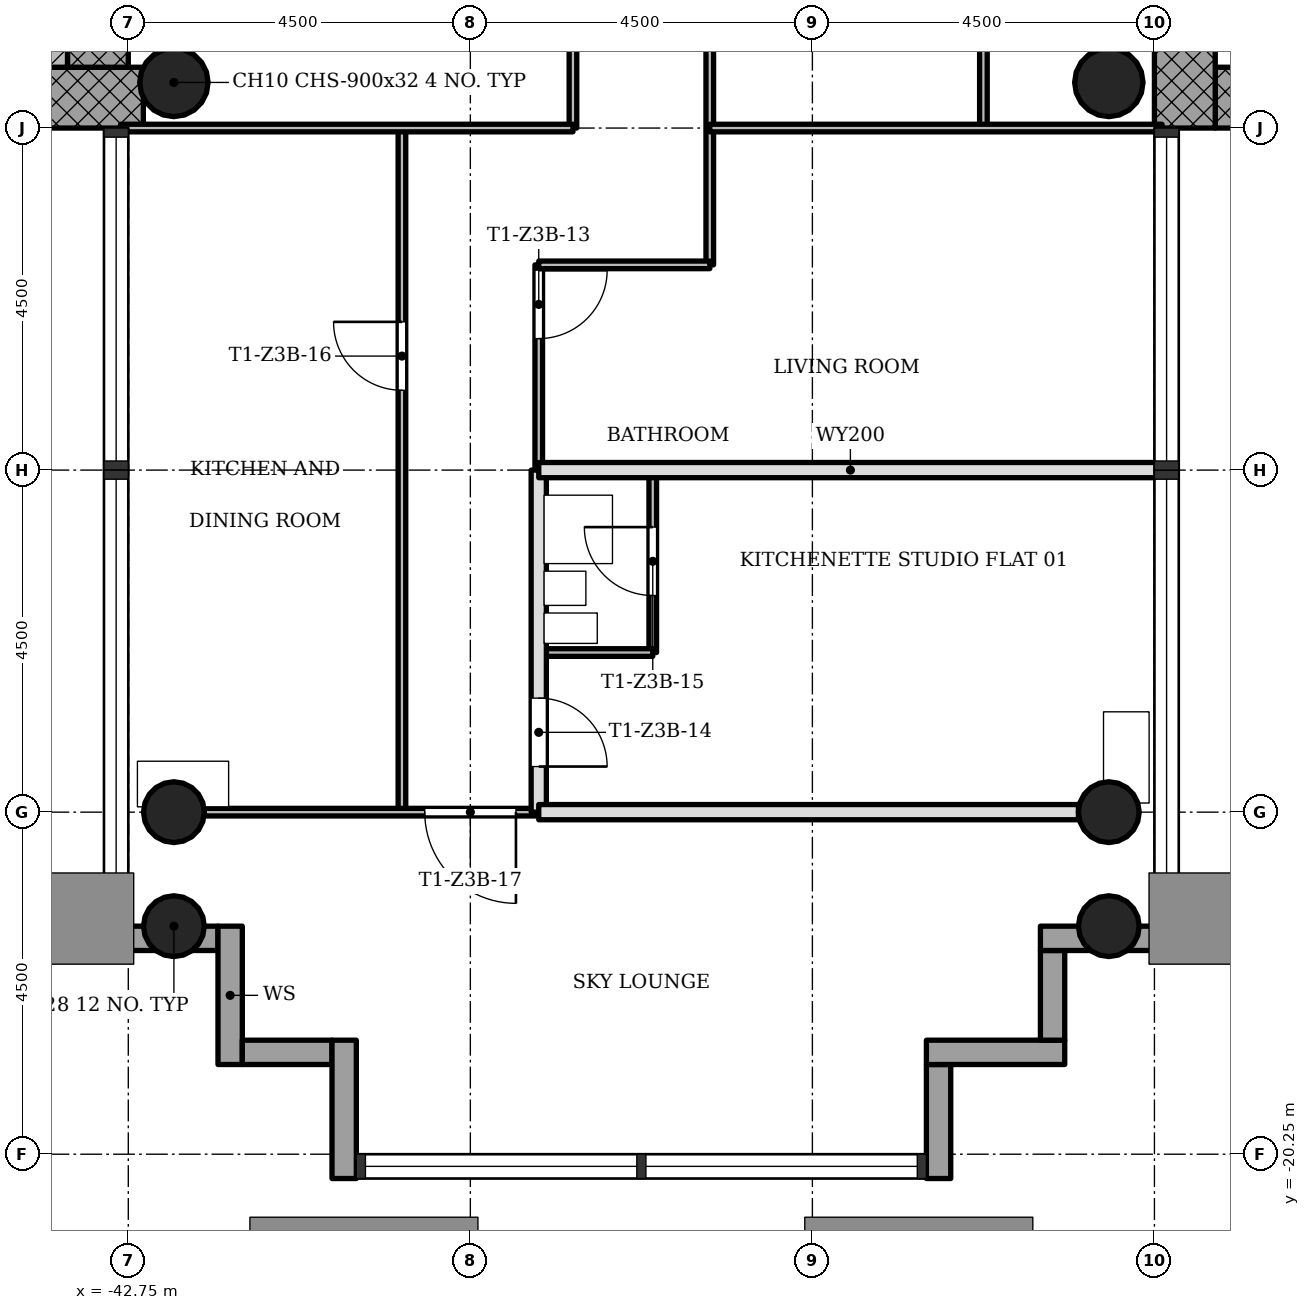
"""IFC4 building model, lengths in metres.
Left out: names, types, materials, properties, quantities, classifications, styles, units other than length and angle.
Written with IfcOpenShell. Run it as: python <this file> out.ifc"""

import sys

from ifc_helpers import new_model, si_unit, direction, frame, frame_2d, origin, origin_2d, place, context, subcontext, project, spatial, rectangle, hollow_circle, extrude, element, fill, save


model = new_model("IFC4")
c1 = context("Model", 3, precision=1e-05, world=origin(), true_north=direction((0.0, 1.0)))
c2 = subcontext(c1, "Body", "Model", "MODEL_VIEW")
j1 = project(units=[si_unit("LENGTHUNIT", "METRE"), si_unit("PLANEANGLEUNIT", "RADIAN")], contexts=[c1])
p1 = place(None, origin())
s1 = spatial("IfcSite", under=j1, at=p1, CompositionType="ELEMENT")
p2 = place(p1, origin())
s2 = spatial("IfcBuilding", under=s1, at=p2, CompositionType="ELEMENT")
p3 = place(p2, frame((0.0, 0.0, 143.9)))
s3 = spatial("IfcBuildingStorey", under=s2, at=p3, CompositionType="ELEMENT", Elevation=143.9)
p4 = place(p3, frame((-28.45, -6.35, 0.0), z_axis=(0.0, 0.0, 1.0), x_axis=(1.0, 0.0, 0.0)))
e1 = element("IfcWall", 1, at=p4, inside=s3, PredefinedType="SHEAR", context=c2, shape_type="SweptSolid", body=[
    extrude(rectangle(XDim=8.2, YDim=0.8, at=frame_2d((4.1, 0.0))), origin(), (0.0, 0.0, 1.0), 3.4),
])
p5 = place(p3, frame((-28.85, 5.95, 0.0), z_axis=(0.0, 0.0, 1.0), x_axis=(0.0, -1.0, 0.0)))
e2 = element("IfcWall", 2, at=p5, inside=s3, PredefinedType="SHEAR", context=c2, shape_type="SweptSolid", body=[
    extrude(rectangle(XDim=12.7, YDim=0.8, at=frame_2d((6.35, 0.0))), origin(), (0.0, 0.0, 1.0), 3.4),
])
p6 = place(p5, frame((5.05, 0.0, 0.0)))
e3 = element("IfcOpeningElement", 3, at=p6, cuts=e2, PredefinedType="OPENING", context=c2, shape_type="SweptSolid", body=[
    extrude(rectangle(XDim=1.8, YDim=2.1, at=frame_2d((0.9, 1.05))), frame((0.0, 0.41, 0.0), z_axis=(0.0, -1.0, 0.0), x_axis=(1.0, 0.0, 0.0)), (0.0, 0.0, 1.0), 0.82),
])
p7 = place(p3, frame((-50.95, -6.35, 0.0), z_axis=(0.0, 0.0, 1.0), x_axis=(1.0, 0.0, 0.0)))
e4 = element("IfcWall", 4, at=p7, inside=s3, PredefinedType="SHEAR", context=c2, shape_type="SweptSolid", body=[
    extrude(rectangle(XDim=8.398, YDim=0.8, at=frame_2d((4.199, 0.0))), origin(), (0.0, 0.0, 1.0), 3.4),
])
p8 = place(p3, frame((-43.15, -5.95, 0.0), z_axis=(0.0, 0.0, 1.0), x_axis=(0.0, 1.0, 0.0)))
e5 = element("IfcWall", 5, at=p8, inside=s3, PredefinedType="SHEAR", context=c2, shape_type="SweptSolid", body=[
    extrude(rectangle(XDim=12.7, YDim=0.8, at=frame_2d((6.35, 0.0))), origin(), (0.0, 0.0, 1.0), 3.4),
])
p9 = place(p8, frame((5.05, 0.0, 0.0)))
e6 = element("IfcOpeningElement", 6, at=p9, cuts=e5, PredefinedType="OPENING", context=c2, shape_type="SweptSolid", body=[
    extrude(rectangle(XDim=1.8, YDim=2.1, at=frame_2d((0.9, 1.05))), frame((0.0, 0.41, 0.0), z_axis=(0.0, -1.0, 0.0), x_axis=(1.0, 0.0, 0.0)), (0.0, 0.0, 1.0), 0.82),
])
for number, where, z_axis, x_axis in (
    (7, (-42.15, -15.75, 0.0), (0.0, 0.0, 1.0), (1.0, 0.0, 0.0)),
    (8, (-29.85, -15.75, 0.0), (0.0, 0.0, 1.0), (1.0, 0.0, 0.0)),
    (9, (-42.15, -17.25, 0.0), (0.0, 0.0, 1.0), (1.0, 0.0, 0.0)),
    (10, (-29.85, -17.25, 0.0), (0.0, 0.0, 1.0), (1.0, 0.0, 0.0)),
):
    element("IfcColumn", number, at=place(p3, frame(where, z_axis=z_axis, x_axis=x_axis)), inside=s3, PredefinedType="COLUMN", context=c2, shape_type="SweptSolid", body=[
        extrude(hollow_circle(Radius=0.4, WallThickness=0.028, at=origin_2d()), origin(), (0.0, 0.0, 1.0), 3.4),
    ])
for number, where, z_axis, x_axis in (
    (11, (-42.15, -6.15, 0.0), (0.0, 0.0, 1.0), (1.0, 0.0, 0.0)),
    (12, (-29.85, -6.15, 0.0), (0.0, 0.0, 1.0), (1.0, 0.0, 0.0)),
):
    element("IfcColumn", number, at=place(p3, frame(where, z_axis=z_axis, x_axis=x_axis)), inside=s3, PredefinedType="COLUMN", context=c2, shape_type="SweptSolid", body=[
        extrude(hollow_circle(Radius=0.45, WallThickness=0.032, at=origin_2d()), origin(), (0.0, 0.0, 1.0), 3.4),
    ])
p10 = place(p3, frame((-43.07, -17.41, -0.3), z_axis=(0.0, 0.0, 1.0), x_axis=(1.0, 0.0, 0.0)))
e13 = element("IfcWall", 13, at=p10, inside=s3, PredefinedType="STANDARD", context=c2, shape_type="SweptSolid", body=[
    extrude(rectangle(XDim=1.5, YDim=0.32, at=frame_2d((0.75, 0.0))), origin(), (0.0, 0.0, 1.0), 3.4),
])
p11 = place(p3, frame((-41.41, -17.25, -0.3), z_axis=(0.0, 0.0, 1.0), x_axis=(0.0, -1.0, 0.0)))
e14 = element("IfcWall", 14, at=p11, inside=s3, PredefinedType="STANDARD", context=c2, shape_type="SweptSolid", body=[
    extrude(rectangle(XDim=1.82, YDim=0.32, at=frame_2d((0.91, 0.0))), origin(), (0.0, 0.0, 1.0), 3.4),
])
p12 = place(p3, frame((-41.25, -18.91, -0.3), z_axis=(0.0, 0.0, 1.0), x_axis=(1.0, 0.0, 0.0)))
e15 = element("IfcWall", 15, at=p12, inside=s3, PredefinedType="STANDARD", context=c2, shape_type="SweptSolid", body=[
    extrude(rectangle(XDim=1.18, YDim=0.32, at=frame_2d((0.59, 0.0))), origin(), (0.0, 0.0, 1.0), 3.4),
])
p13 = place(p3, frame((-39.91, -18.75, -0.3), z_axis=(0.0, 0.0, 1.0), x_axis=(0.0, -1.0, 0.0)))
e16 = element("IfcWall", 16, at=p13, inside=s3, PredefinedType="STANDARD", context=c2, shape_type="SweptSolid", body=[
    extrude(rectangle(XDim=1.82, YDim=0.32, at=frame_2d((0.91, 0.0))), origin(), (0.0, 0.0, 1.0), 3.4),
])
p14 = place(p3, frame((-32.09, -20.57, -0.3), z_axis=(0.0, 0.0, 1.0), x_axis=(0.0, 1.0, 0.0)))
e17 = element("IfcWall", 17, at=p14, inside=s3, PredefinedType="STANDARD", context=c2, shape_type="SweptSolid", body=[
    extrude(rectangle(XDim=1.5, YDim=0.32, at=frame_2d((0.75, 0.0))), origin(), (0.0, 0.0, 1.0), 3.4),
])
p15 = place(p3, frame((-32.25, -18.91, -0.3), z_axis=(0.0, 0.0, 1.0), x_axis=(1.0, 0.0, 0.0)))
e18 = element("IfcWall", 18, at=p15, inside=s3, PredefinedType="STANDARD", context=c2, shape_type="SweptSolid", body=[
    extrude(rectangle(XDim=1.82, YDim=0.32, at=frame_2d((0.91, 0.0))), origin(), (0.0, 0.0, 1.0), 3.4),
])
p16 = place(p3, frame((-30.59, -18.75, -0.3), z_axis=(0.0, 0.0, 1.0), x_axis=(0.0, 1.0, 0.0)))
e19 = element("IfcWall", 19, at=p16, inside=s3, PredefinedType="STANDARD", context=c2, shape_type="SweptSolid", body=[
    extrude(rectangle(XDim=1.18, YDim=0.32, at=frame_2d((0.59, 0.0))), origin(), (0.0, 0.0, 1.0), 3.4),
])
p17 = place(p3, frame((-30.75, -17.41, -0.3), z_axis=(0.0, 0.0, 1.0), x_axis=(1.0, 0.0, 0.0)))
e20 = element("IfcWall", 20, at=p17, inside=s3, PredefinedType="STANDARD", context=c2, shape_type="SweptSolid", body=[
    extrude(rectangle(XDim=1.82, YDim=0.32, at=frame_2d((0.91, 0.0))), origin(), (0.0, 0.0, 1.0), 3.4),
])
p18 = place(p3, frame((-39.15, -15.75, 0.0), z_axis=(0.0, 0.0, 1.0), x_axis=(0.0, 1.0, 0.0)))
e21 = element("IfcWall", 21, at=p18, inside=s3, PredefinedType="PARTITIONING", context=c2, shape_type="SweptSolid", body=[
    extrude(rectangle(XDim=9.0, YDim=0.1, at=frame_2d((4.5, 0.0))), origin(), (0.0, 0.0, 1.0), 3.0),
])
p19 = place(p18, frame((5.55, 0.0, 0.0)))
e22 = element("IfcOpeningElement", 22, at=p19, cuts=e21, PredefinedType="OPENING", context=c2, shape_type="SweptSolid", body=[
    extrude(rectangle(XDim=0.9, YDim=2.1, at=frame_2d((0.45, 1.05))), frame((0.0, 0.06, 0.0), z_axis=(0.0, -1.0, 0.0), x_axis=(1.0, 0.0, 0.0)), (0.0, 0.0, 1.0), 0.12),
])
p20 = place(p3, frame((-37.35, -11.25, 0.0), z_axis=(0.0, 0.0, 1.0), x_axis=(0.0, 1.0, 0.0)))
e23 = element("IfcWall", 23, at=p20, inside=s3, PredefinedType="PARTITIONING", context=c2, shape_type="SweptSolid", body=[
    extrude(rectangle(XDim=2.7, YDim=0.1, at=frame_2d((1.35, 0.0))), origin(), (0.0, 0.0, 1.0), 3.0),
])
p21 = place(p20, frame((1.73, 0.0, 0.0)))
e24 = element("IfcOpeningElement", 24, at=p21, cuts=e23, PredefinedType="OPENING", context=c2, shape_type="SweptSolid", body=[
    extrude(rectangle(XDim=0.9, YDim=2.1, at=frame_2d((0.45, 1.05))), frame((0.0, 0.06, 0.0), z_axis=(0.0, -1.0, 0.0), x_axis=(1.0, 0.0, 0.0)), (0.0, 0.0, 1.0), 0.12),
])
p22 = place(p3, frame((-37.35, -15.75, 0.0), z_axis=(0.0, 0.0, 1.0), x_axis=(0.0, 1.0, 0.0)))
e25 = element("IfcWall", 25, at=p22, inside=s3, PredefinedType="SOLIDWALL", context=c2, shape_type="SweptSolid", body=[
    extrude(rectangle(XDim=4.5, YDim=0.2, at=frame_2d((2.25, 0.0))), origin(), (0.0, 0.0, 1.0), 3.0),
])
p23 = place(p22, frame((0.6, 0.0, 0.0)))
e26 = element("IfcOpeningElement", 26, at=p23, cuts=e25, PredefinedType="OPENING", context=c2, shape_type="SweptSolid", body=[
    extrude(rectangle(XDim=0.9, YDim=2.1, at=frame_2d((0.45, 1.05))), frame((0.0, 0.11, 0.0), z_axis=(0.0, -1.0, 0.0), x_axis=(1.0, 0.0, 0.0)), (0.0, 0.0, 1.0), 0.22),
])
p24 = place(p3, frame((-36.9, -6.75, 0.0), z_axis=(0.0, 0.0, 1.0), x_axis=(0.0, 1.0, 0.0)))
e27 = element("IfcWall", 27, at=p24, inside=s3, PredefinedType="PARTITIONING", context=c2, shape_type="SweptSolid", body=[
    extrude(rectangle(XDim=2.25, YDim=0.1, at=frame_2d((1.125, 0.0))), origin(), (0.0, 0.0, 1.0), 3.0),
])
p25 = place(p3, frame((-35.85, -13.65, 0.0), z_axis=(0.0, 0.0, 1.0), x_axis=(0.0, 1.0, 0.0)))
e28 = element("IfcWall", 28, at=p25, inside=s3, PredefinedType="PARTITIONING", context=c2, shape_type="SweptSolid", body=[
    extrude(rectangle(XDim=2.4, YDim=0.1, at=frame_2d((1.2, 0.0))), origin(), (0.0, 0.0, 1.0), 3.0),
])
p26 = place(p25, frame((0.75, 0.0, 0.0)))
e29 = element("IfcOpeningElement", 29, at=p26, cuts=e28, PredefinedType="OPENING", context=c2, shape_type="SweptSolid", body=[
    extrude(rectangle(XDim=0.9, YDim=2.1, at=frame_2d((0.45, 1.05))), frame((0.0, 0.06, 0.0), z_axis=(0.0, -1.0, 0.0), x_axis=(1.0, 0.0, 0.0)), (0.0, 0.0, 1.0), 0.12),
])
p27 = place(p3, frame((-35.1, -8.55, 0.0), z_axis=(0.0, 0.0, 1.0), x_axis=(0.0, 1.0, 0.0)))
e30 = element("IfcWall", 30, at=p27, inside=s3, PredefinedType="PARTITIONING", context=c2, shape_type="SweptSolid", body=[
    extrude(rectangle(XDim=4.05, YDim=0.1, at=frame_2d((2.025, 0.0))), origin(), (0.0, 0.0, 1.0), 3.0),
])
p28 = place(p3, frame((-31.5, -6.75, 0.0), z_axis=(0.0, 0.0, 1.0), x_axis=(0.0, 1.0, 0.0)))
e31 = element("IfcWall", 31, at=p28, inside=s3, PredefinedType="PARTITIONING", context=c2, shape_type="SweptSolid", body=[
    extrude(rectangle(XDim=5.25, YDim=0.1, at=frame_2d((2.625, 0.0))), origin(), (0.0, 0.0, 1.0), 3.0),
])
p29 = place(p28, frame((3.3, 0.0, 0.0)))
e32 = element("IfcOpeningElement", 32, at=p29, cuts=e31, PredefinedType="OPENING", context=c2, shape_type="SweptSolid", body=[
    extrude(rectangle(XDim=0.9, YDim=2.1, at=frame_2d((0.45, 1.05))), frame((0.0, 0.06, 0.0), z_axis=(0.0, -1.0, 0.0), x_axis=(1.0, 0.0, 0.0)), (0.0, 0.0, 1.0), 0.12),
])
p30 = place(p3, frame((-41.75, -15.75, 0.0), z_axis=(0.0, 0.0, 1.0), x_axis=(1.0, 0.0, 0.0)))
e33 = element("IfcWall", 33, at=p30, inside=s3, PredefinedType="PARTITIONING", context=c2, shape_type="SweptSolid", body=[
    extrude(rectangle(XDim=4.4, YDim=0.1, at=frame_2d((2.2, 0.0))), origin(), (0.0, 0.0, 1.0), 3.0),
])
p31 = place(p30, frame((2.9, 0.0, 0.0)))
e34 = element("IfcOpeningElement", 34, at=p31, cuts=e33, PredefinedType="OPENING", context=c2, shape_type="SweptSolid", body=[
    extrude(rectangle(XDim=1.2, YDim=2.1, at=frame_2d((0.6, 1.05))), frame((0.0, 0.06, 0.0), z_axis=(0.0, -1.0, 0.0), x_axis=(1.0, 0.0, 0.0)), (0.0, 0.0, 1.0), 0.12),
])
p32 = place(p3, frame((-37.35, -15.75, 0.0), z_axis=(0.0, 0.0, 1.0), x_axis=(1.0, 0.0, 0.0)))
e35 = element("IfcWall", 35, at=p32, inside=s3, PredefinedType="SOLIDWALL", context=c2, shape_type="SweptSolid", body=[
    extrude(rectangle(XDim=7.1, YDim=0.2, at=frame_2d((3.55, 0.0))), origin(), (0.0, 0.0, 1.0), 3.0),
])
p33 = place(p3, frame((-37.35, -13.65, 0.0), z_axis=(0.0, 0.0, 1.0), x_axis=(1.0, 0.0, 0.0)))
e36 = element("IfcWall", 36, at=p33, inside=s3, PredefinedType="PARTITIONING", context=c2, shape_type="SweptSolid", body=[
    extrude(rectangle(XDim=1.5, YDim=0.1, at=frame_2d((0.75, 0.0))), origin(), (0.0, 0.0, 1.0), 3.0),
])
p34 = place(p3, frame((-37.35, -11.25, 0.0), z_axis=(0.0, 0.0, 1.0), x_axis=(1.0, 0.0, 0.0)))
e37 = element("IfcWall", 37, at=p34, inside=s3, PredefinedType="SOLIDWALL", context=c2, shape_type="SweptSolid", body=[
    extrude(rectangle(XDim=8.2, YDim=0.2, at=frame_2d((4.1, 0.0))), origin(), (0.0, 0.0, 1.0), 3.0),
])
p35 = place(p3, frame((-37.35, -8.55, 0.0), z_axis=(0.0, 0.0, 1.0), x_axis=(1.0, 0.0, 0.0)))
e38 = element("IfcWall", 38, at=p35, inside=s3, PredefinedType="PARTITIONING", context=c2, shape_type="SweptSolid", body=[
    extrude(rectangle(XDim=2.25, YDim=0.1, at=frame_2d((1.125, 0.0))), origin(), (0.0, 0.0, 1.0), 3.0),
])
for number, where, z_axis, x_axis in (
    (39, (-42.85, -6.75, 0.0), (0.0, 0.0, 1.0), (1.0, 0.0, 0.0)),
    (40, (-35.1, -6.75, 0.0), (0.0, 0.0, 1.0), (1.0, 0.0, 0.0)),
):
    element("IfcWall", number, at=place(p3, frame(where, z_axis=z_axis, x_axis=x_axis)), inside=s3, PredefinedType="PARTITIONING", context=c2, shape_type="SweptSolid", body=[
        extrude(rectangle(XDim=5.95, YDim=0.1, at=frame_2d((2.975, 0.0))), origin(), (0.0, 0.0, 1.0), 3.0),
    ])
p36 = place(p3, frame((-43.75, -1.85, 0.0), z_axis=(0.0, 0.0, 1.0), x_axis=(0.0, -1.0, 0.0)))
e41 = element("IfcWall", 41, at=p36, inside=s3, PredefinedType="SHEAR", context=c2, shape_type="SweptSolid", body=[
    extrude(rectangle(XDim=4.1, YDim=0.4, at=frame_2d((2.05, 0.0))), origin(), (0.0, 0.0, 1.0), 3.4),
])
p37 = place(p21, origin())
e42 = element("IfcDoor", 42, at=p37, inside=s3, OperationType="SINGLE_SWING_RIGHT", PredefinedType="DOOR", context=c2, shape_type="SweptSolid", body=[
    extrude(rectangle(XDim=0.9, YDim=2.1, at=frame_2d((0.45, 1.05))), frame((0.0, 0.025, 0.0), z_axis=(0.0, -1.0, 0.0), x_axis=(1.0, 0.0, 0.0)), (0.0, 0.0, 1.0), 0.05),
])
fill(e24, e42)
p38 = place(p23, origin())
e43 = element("IfcDoor", 43, at=p38, inside=s3, OperationType="SINGLE_SWING_LEFT", PredefinedType="DOOR", context=c2, shape_type="SweptSolid", body=[
    extrude(rectangle(XDim=0.9, YDim=2.1, at=frame_2d((0.45, 1.05))), frame((0.0, 0.025, 0.0), z_axis=(0.0, -1.0, 0.0), x_axis=(1.0, 0.0, 0.0)), (0.0, 0.0, 1.0), 0.05),
])
fill(e26, e43)
p39 = place(p26, origin())
e44 = element("IfcDoor", 44, at=p39, inside=s3, OperationType="SINGLE_SWING_LEFT", PredefinedType="DOOR", context=c2, shape_type="SweptSolid", body=[
    extrude(rectangle(XDim=0.9, YDim=2.1, at=frame_2d((0.45, 1.05))), frame((0.0, 0.025, 0.0), z_axis=(0.0, -1.0, 0.0), x_axis=(1.0, 0.0, 0.0)), (0.0, 0.0, 1.0), 0.05),
])
fill(e29, e44)
p40 = place(p19, origin())
e45 = element("IfcDoor", 45, at=p40, inside=s3, OperationType="SINGLE_SWING_LEFT", PredefinedType="DOOR", context=c2, shape_type="SweptSolid", body=[
    extrude(rectangle(XDim=0.9, YDim=2.1, at=frame_2d((0.45, 1.05))), frame((0.0, 0.025, 0.0), z_axis=(0.0, -1.0, 0.0), x_axis=(1.0, 0.0, 0.0)), (0.0, 0.0, 1.0), 0.05),
])
fill(e22, e45)
p41 = place(p31, origin())
e46 = element("IfcDoor", 46, at=p41, inside=s3, OperationType="SINGLE_SWING_RIGHT", PredefinedType="DOOR", context=c2, shape_type="SweptSolid", body=[
    extrude(rectangle(XDim=1.2, YDim=2.1, at=frame_2d((0.6, 1.05))), frame((0.0, 0.025, 0.0), z_axis=(0.0, -1.0, 0.0), x_axis=(1.0, 0.0, 0.0)), (0.0, 0.0, 1.0), 0.05),
])
fill(e34, e46)
save(model, sys.argv[1])
